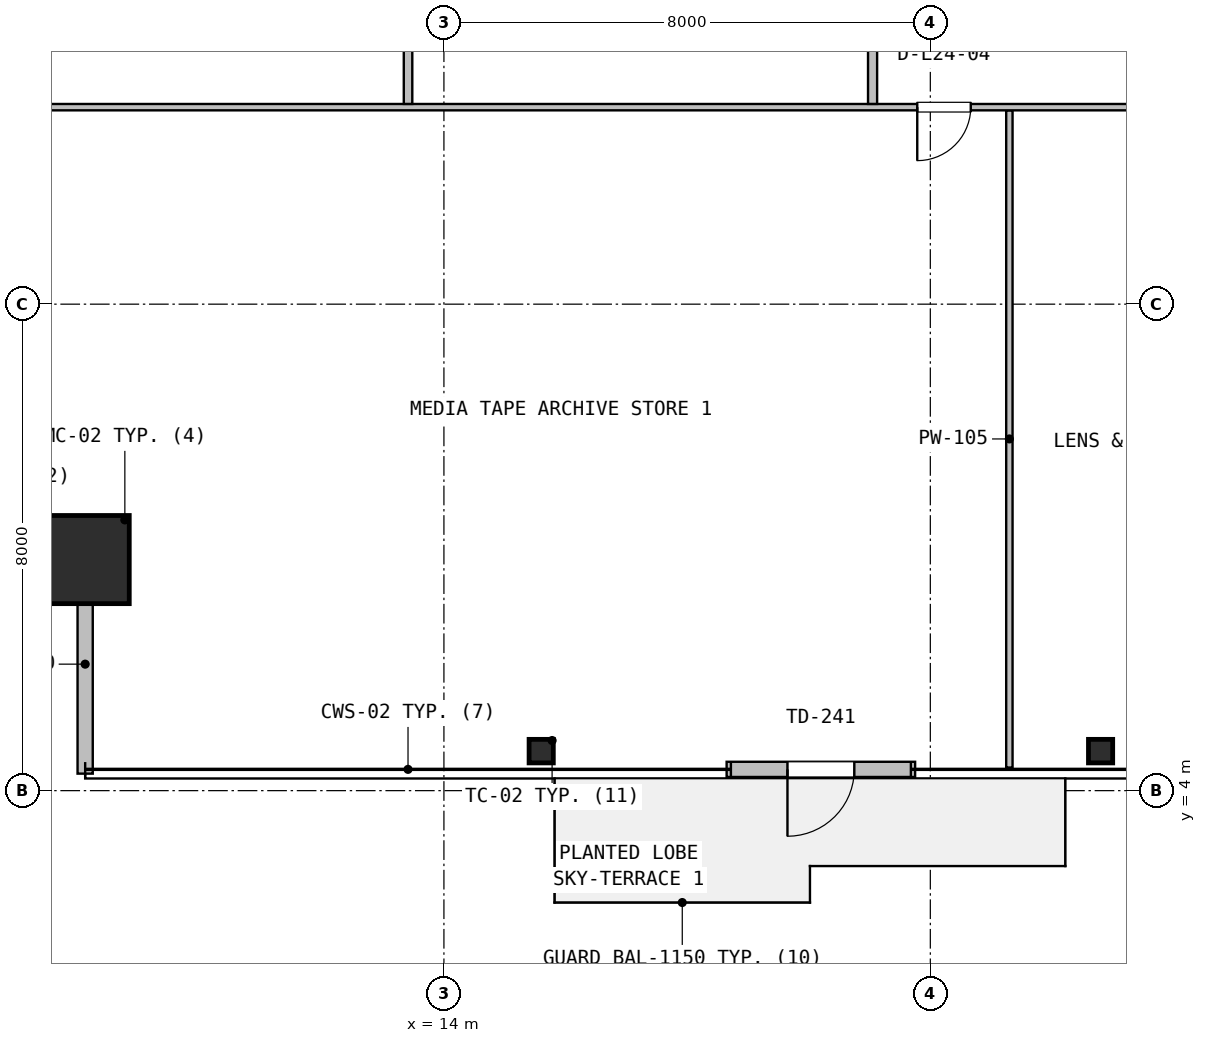
"""IFC4 building model, lengths in metres.
Left out: names, types, materials, properties, quantities, classifications, styles, units other than length and angle.
Written with IfcOpenShell. Run it as: python <this file> out.ifc"""

import sys

from ifc_helpers import new_model, si_unit, direction, frame, frame_2d, origin, origin_2d, place, context, subcontext, project, spatial, rectangle, hollow_rectangle, i_section, extrude, source, transform, mapped, element, fill, save


model = new_model("IFC4")
c1 = context("Model", 3, precision=1e-05, world=origin(), true_north=direction((0.0, 1.0)))
c2 = subcontext(c1, "Body", "Model", "MODEL_VIEW")
j1 = project(units=[si_unit("LENGTHUNIT", "METRE"), si_unit("PLANEANGLEUNIT", "RADIAN")], contexts=[c1])
p1 = place(None, origin())
s1 = spatial("IfcSite", under=j1, at=p1, CompositionType="ELEMENT")
p2 = place(p1, origin())
s2 = spatial("IfcBuilding", under=s1, at=p2, CompositionType="ELEMENT")
p3 = place(p2, frame((0.0, 0.0, 103.0)))
s3 = spatial("IfcBuildingStorey", under=s2, at=p3, CompositionType="ELEMENT", Elevation=103.0)
m1 = source(origin(), c2, "Body", "SweptSolid", [
    extrude(hollow_rectangle(XDim=1.45, YDim=1.45, WallThickness=0.055, at=origin_2d()), origin(), (0.0, 0.0, 1.0), 3.8),
])
p4 = place(p3, frame((8.1, 7.8, 0.0), z_axis=(0.0, 0.0, 1.0), x_axis=(1.0, 0.0, 0.0)))
e1 = element("IfcColumn", 1, at=p4, inside=s3, PredefinedType="COLUMN", context=c2, shape_type="MappedRepresentation", body=[
    mapped(m1, transform((0.0, 0.0, 0.0), x_axis=(1.0, 0.0, 0.0), y_axis=(0.0, 1.0, 0.0), z_axis=(0.0, 0.0, 1.0), scale=1.0)),
])
m2 = source(origin(), c2, "Body", "SweptSolid", [
    extrude(i_section(OverallWidth=0.398, OverallDepth=0.387, WebThickness=0.021, FlangeThickness=0.033, FilletRadius=0.018, at=origin_2d()), origin(), (0.0, 0.0, 1.0), 3.8),
])
for number, where, z_axis, x_axis in (
    (2, (15.6, 4.65, 0.0), (0.0, 0.0, 1.0), (1.0, 0.0, 0.0)),
    (3, (24.8, 4.65, 0.0), (0.0, 0.0, 1.0), (1.0, 0.0, 0.0)),
):
    element("IfcColumn", number, at=place(p3, frame(where, z_axis=z_axis, x_axis=x_axis)), inside=s3, PredefinedType="COLUMN", context=c2, shape_type="MappedRepresentation", body=[
        mapped(m2, transform((0.0, 0.0, 0.0), x_axis=(1.0, 0.0, 0.0), y_axis=(0.0, 1.0, 0.0), z_axis=(0.0, 0.0, 1.0), scale=1.0)),
    ])
p5 = place(p3, frame((18.65, 4.35, 0.0), z_axis=(0.0, 0.0, 1.0), x_axis=(1.0, 0.0, 0.0)))
e4 = element("IfcWall", 4, at=p5, inside=s3, PredefinedType="SOLIDWALL", context=c2, shape_type="SweptSolid", body=[
    extrude(rectangle(XDim=3.1, YDim=0.25, at=frame_2d((1.55, 0.0))), origin(), (0.0, 0.0, 1.0), 3.53),
])
p6 = place(p5, frame((1.0, 0.0, 0.0)))
e5 = element("IfcOpeningElement", 5, at=p6, cuts=e4, PredefinedType="OPENING", context=c2, shape_type="SweptSolid", body=[
    extrude(rectangle(XDim=1.1, YDim=2.15, at=frame_2d((0.55, 1.075))), frame((0.0, 0.135, 0.0), z_axis=(0.0, -1.0, 0.0), x_axis=(1.0, 0.0, 0.0)), (0.0, 0.0, 1.0), 0.27),
])
p7 = place(p3, frame((8.1, 4.28, 0.0), z_axis=(0.0, 0.0, 1.0), x_axis=(0.0, 1.0, 0.0)))
e6 = element("IfcWall", 6, at=p7, inside=s3, PredefinedType="SOLIDWALL", context=c2, shape_type="SweptSolid", body=[
    extrude(rectangle(XDim=3.6, YDim=0.25, at=frame_2d((1.8, 0.0))), origin(), (0.0, 0.0, 1.0), 3.108),
])
p8 = place(p3, frame((23.3, 4.38, 0.0), z_axis=(0.0, 0.0, 1.0), x_axis=(0.0, 1.0, 0.0)))
e7 = element("IfcWall", 7, at=p8, inside=s3, PredefinedType="PARTITIONING", context=c2, shape_type="SweptSolid", body=[
    extrude(rectangle(XDim=10.808, YDim=0.105, at=frame_2d((5.404, 0.0))), origin(), (0.0, 0.0, 1.0), 3.108),
])
p9 = place(p3, frame((4.68, 15.24, 0.0), z_axis=(0.0, 0.0, 1.0), x_axis=(1.0, 0.0, 0.0)))
e8 = element("IfcWall", 8, at=p9, inside=s3, PredefinedType="PARTITIONING", context=c2, shape_type="SweptSolid", body=[
    extrude(rectangle(XDim=58.64, YDim=0.105, at=frame_2d((29.32, 0.0))), origin(), (0.0, 0.0, 1.0), 2.83),
])
p10 = place(p9, frame((17.105, 0.0, 0.0)))
e9 = element("IfcOpeningElement", 9, at=p10, cuts=e8, PredefinedType="OPENING", context=c2, shape_type="SweptSolid", body=[
    extrude(rectangle(XDim=0.88, YDim=2.06, at=frame_2d((0.44, 1.03))), frame((0.0, 0.062, 0.0), z_axis=(0.0, -1.0, 0.0), x_axis=(1.0, 0.0, 0.0)), (0.0, 0.0, 1.0), 0.125),
])
p11 = place(p9, frame((21.005, 0.0, 0.0)))
e10 = element("IfcOpeningElement", 10, at=p11, cuts=e8, PredefinedType="OPENING", context=c2, shape_type="SweptSolid", body=[
    extrude(rectangle(XDim=0.88, YDim=2.06, at=frame_2d((0.44, 1.03))), frame((0.0, 0.062, 0.0), z_axis=(0.0, -1.0, 0.0), x_axis=(1.0, 0.0, 0.0)), (0.0, 0.0, 1.0), 0.125),
])
p12 = place(p9, frame((27.42, 0.0, 0.0)))
e11 = element("IfcOpeningElement", 11, at=p12, cuts=e8, PredefinedType="OPENING", context=c2, shape_type="SweptSolid", body=[
    extrude(rectangle(XDim=0.88, YDim=2.06, at=frame_2d((0.44, 1.03))), frame((0.0, 0.062, 0.0), z_axis=(0.0, -1.0, 0.0), x_axis=(1.0, 0.0, 0.0)), (0.0, 0.0, 1.0), 0.125),
])
p13 = place(p9, frame((35.845, 0.0, 0.0)))
e12 = element("IfcOpeningElement", 12, at=p13, cuts=e8, PredefinedType="OPENING", context=c2, shape_type="SweptSolid", body=[
    extrude(rectangle(XDim=0.92, YDim=2.08, at=frame_2d((0.46, 1.04))), frame((0.0, 0.062, 0.0), z_axis=(0.0, -1.0, 0.0), x_axis=(1.0, 0.0, 0.0)), (0.0, 0.0, 1.0), 0.125),
])
p14 = place(p9, frame((41.71, 0.0, 0.0)))
e13 = element("IfcOpeningElement", 13, at=p14, cuts=e8, PredefinedType="OPENING", context=c2, shape_type="SweptSolid", body=[
    extrude(rectangle(XDim=1.05, YDim=2.1, at=frame_2d((0.525, 1.05))), frame((0.0, 0.062, 0.0), z_axis=(0.0, -1.0, 0.0), x_axis=(1.0, 0.0, 0.0)), (0.0, 0.0, 1.0), 0.125),
])
p15 = place(p3, frame((13.41, 15.293, 0.0), z_axis=(0.0, 0.0, 1.0), x_axis=(0.0, 1.0, 0.0)))
e14 = element("IfcWall", 14, at=p15, inside=s3, PredefinedType="PARTITIONING", context=c2, shape_type="SweptSolid", body=[
    extrude(rectangle(XDim=17.987, YDim=0.14, at=frame_2d((8.994, 0.0))), origin(), (0.0, 0.0, 1.0), 3.222),
])
p16 = place(p3, frame((21.05, 15.293, 0.0), z_axis=(0.0, 0.0, 1.0), x_axis=(0.0, 1.0, 0.0)))
e15 = element("IfcWall", 15, at=p16, inside=s3, PredefinedType="PARTITIONING", context=c2, shape_type="SweptSolid", body=[
    extrude(rectangle(XDim=17.987, YDim=0.15, at=frame_2d((8.994, 0.0))), origin(), (0.0, 0.0, 1.0), 3.222),
])
p17 = place(p16, frame((8.562, 0.0, 0.0)))
e16 = element("IfcOpeningElement", 16, at=p17, cuts=e15, PredefinedType="OPENING", context=c2, shape_type="SweptSolid", body=[
    extrude(rectangle(XDim=0.88, YDim=2.06, at=frame_2d((0.44, 1.03))), frame((0.0, 0.085, 0.0), z_axis=(0.0, -1.0, 0.0), x_axis=(1.0, 0.0, 0.0)), (0.0, 0.0, 1.0), 0.17),
])
m3 = source(origin(), c2, "Body", "SweptSolid", [
    extrude(rectangle(XDim=1.1, YDim=2.15, at=frame_2d((0.55, 1.075))), frame((0.0, 0.025, 0.0), z_axis=(0.0, -1.0, 0.0), x_axis=(1.0, 0.0, 0.0)), (0.0, 0.0, 1.0), 0.05),
])
p18 = place(p6, frame((1.1, 0.0, 0.0), z_axis=(0.0, 0.0, 1.0), x_axis=(-1.0, 0.0, 0.0)))
e17 = element("IfcDoor", 17, at=p18, inside=s3, OperationType="SINGLE_SWING_LEFT", PredefinedType="DOOR", context=c2, shape_type="MappedRepresentation", body=[
    mapped(m3, transform((0.0, 0.0, 0.0), x_axis=(1.0, 0.0, 0.0), y_axis=(0.0, 1.0, 0.0), z_axis=(0.0, 0.0, 1.0), scale=1.0)),
])
fill(e5, e17)
m4 = source(origin(), c2, "Body", "SweptSolid", [
    extrude(rectangle(XDim=0.88, YDim=2.06, at=frame_2d((0.44, 1.03))), frame((0.0, 0.025, 0.0), z_axis=(0.0, -1.0, 0.0), x_axis=(1.0, 0.0, 0.0)), (0.0, 0.0, 1.0), 0.05),
])
p19 = place(p10, frame((0.88, 0.0, 0.0), z_axis=(0.0, 0.0, 1.0), x_axis=(-1.0, 0.0, 0.0)))
e18 = element("IfcDoor", 18, at=p19, inside=s3, OperationType="SINGLE_SWING_LEFT", PredefinedType="DOOR", context=c2, shape_type="MappedRepresentation", body=[
    mapped(m4, transform((0.0, 0.0, 0.0), x_axis=(1.0, 0.0, 0.0), y_axis=(0.0, 1.0, 0.0), z_axis=(0.0, 0.0, 1.0), scale=1.0)),
])
fill(e9, e18)
save(model, sys.argv[1])
